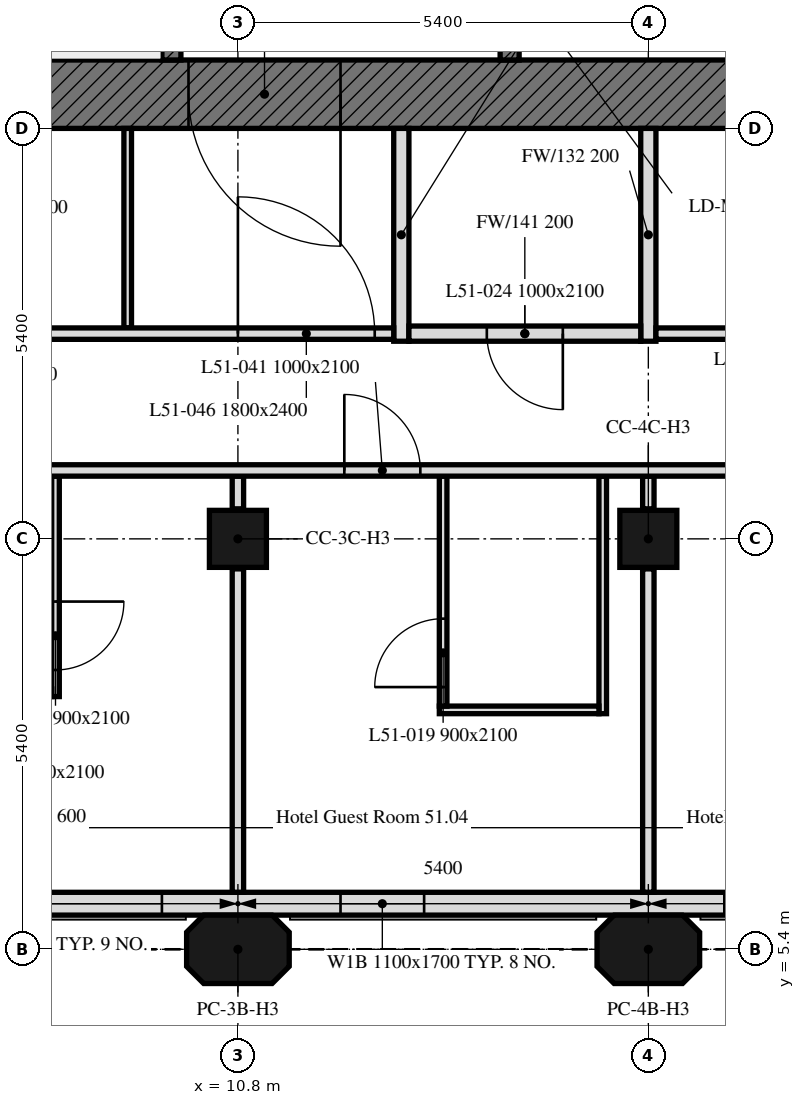
"""IFC4 building model, lengths in metres.
Left out: names, types, materials, properties, quantities, classifications, styles, units other than length and angle.
Written with IfcOpenShell. Run it as: python <this file> out.ifc"""

import sys

from ifc_helpers import new_model, si_unit, direction, frame, frame_2d, origin, origin_2d, place, context, subcontext, project, spatial, polyline, rectangle, outline, extrude, element, fill, save


model = new_model("IFC4")
c1 = context("Model", 3, precision=1e-05, world=origin(), true_north=direction((0.0, 1.0)))
c2 = subcontext(c1, "Body", "Model", "MODEL_VIEW")
j1 = project(units=[si_unit("LENGTHUNIT", "METRE"), si_unit("PLANEANGLEUNIT", "RADIAN")], contexts=[c1])
p1 = place(None, origin())
s1 = spatial("IfcSite", under=j1, at=p1, CompositionType="ELEMENT")
p2 = place(p1, origin())
s2 = spatial("IfcBuilding", under=s1, at=p2, CompositionType="ELEMENT")
p3 = place(p2, frame((0.0, 0.0, 207.1)))
s3 = spatial("IfcBuildingStorey", under=s2, at=p3, CompositionType="ELEMENT", Elevation=207.1)
for number, where, z_axis, x_axis in (
    (1, (10.8, 5.4, 0.0), (0.0, 0.0, 1.0), (1.0, 0.0, 0.0)),
    (2, (16.2, 5.4, 0.0), (0.0, 0.0, 1.0), (1.0, 0.0, 0.0)),
):
    element("IfcColumn", number, at=place(p3, frame(where, z_axis=z_axis, x_axis=x_axis)), inside=s3, PredefinedType="COLUMN", context=c2, shape_type="SweptSolid", body=[
        extrude(outline(polyline([(-0.45, -0.45), (0.45, -0.45), (0.675, -0.225), (0.675, 0.225), (0.45, 0.45), (-0.45, 0.45), (-0.675, 0.225), (-0.675, -0.225), (-0.45, -0.45)])), origin(), (0.0, 0.0, 1.0), 3.0),
    ])
for number, where, z_axis, x_axis in (
    (3, (10.8, 10.8, 0.0), (0.0, 0.0, 1.0), (1.0, 0.0, 0.0)),
    (4, (16.2, 10.8, 0.0), (0.0, 0.0, 1.0), (1.0, 0.0, 0.0)),
):
    element("IfcColumn", number, at=place(p3, frame(where, z_axis=z_axis, x_axis=x_axis)), inside=s3, PredefinedType="COLUMN", context=c2, shape_type="SweptSolid", body=[
        extrude(rectangle(XDim=0.75, YDim=0.75, at=origin_2d()), origin(), (0.0, 0.0, 1.0), 3.0),
    ])
p4 = place(p3, frame((5.586, 6.0, 0.0), z_axis=(0.0, 0.0, 1.0), x_axis=(1.0, 0.0, 0.0)))
e5 = element("IfcWall", 5, at=p4, inside=s3, PredefinedType="SOLIDWALL", context=c2, shape_type="SweptSolid", body=[
    extrude(rectangle(XDim=32.027, YDim=0.3, at=frame_2d((16.014, 0.0))), origin(), (0.0, 0.0, 1.0), 3.0),
])
p5 = place(p4, frame((0.814, 0.0, 0.9)))
e6 = element("IfcOpeningElement", 6, at=p5, cuts=e5, PredefinedType="OPENING", context=c2, shape_type="SweptSolid", body=[
    extrude(rectangle(XDim=3.4, YDim=1.7, at=frame_2d((1.7, 0.85))), frame((0.0, 0.16, 0.0), z_axis=(0.0, -1.0, 0.0), x_axis=(1.0, 0.0, 0.0)), (0.0, 0.0, 1.0), 0.32),
])
p6 = place(p4, frame((6.564, 0.0, 0.9)))
e7 = element("IfcOpeningElement", 7, at=p6, cuts=e5, PredefinedType="OPENING", context=c2, shape_type="SweptSolid", body=[
    extrude(rectangle(XDim=1.1, YDim=1.7, at=frame_2d((0.55, 0.85))), frame((0.0, 0.16, 0.0), z_axis=(0.0, -1.0, 0.0), x_axis=(1.0, 0.0, 0.0)), (0.0, 0.0, 1.0), 0.32),
])
p7 = place(p4, frame((11.614, 0.0, 0.9)))
e8 = element("IfcOpeningElement", 8, at=p7, cuts=e5, PredefinedType="OPENING", context=c2, shape_type="SweptSolid", body=[
    extrude(rectangle(XDim=3.4, YDim=1.7, at=frame_2d((1.7, 0.85))), frame((0.0, 0.16, 0.0), z_axis=(0.0, -1.0, 0.0), x_axis=(1.0, 0.0, 0.0)), (0.0, 0.0, 1.0), 0.32),
])
p8 = place(p4, frame((17.364, 0.0, 0.9)))
e9 = element("IfcOpeningElement", 9, at=p8, cuts=e5, PredefinedType="OPENING", context=c2, shape_type="SweptSolid", body=[
    extrude(rectangle(XDim=1.1, YDim=1.7, at=frame_2d((0.55, 0.85))), frame((0.0, 0.16, 0.0), z_axis=(0.0, -1.0, 0.0), x_axis=(1.0, 0.0, 0.0)), (0.0, 0.0, 1.0), 0.32),
])
p9 = place(p4, frame((22.414, 0.0, 0.9)))
e10 = element("IfcOpeningElement", 10, at=p9, cuts=e5, PredefinedType="OPENING", context=c2, shape_type="SweptSolid", body=[
    extrude(rectangle(XDim=3.4, YDim=1.7, at=frame_2d((1.7, 0.85))), frame((0.0, 0.16, 0.0), z_axis=(0.0, -1.0, 0.0), x_axis=(1.0, 0.0, 0.0)), (0.0, 0.0, 1.0), 0.32),
])
p10 = place(p4, frame((28.164, 0.0, 0.9)))
e11 = element("IfcOpeningElement", 11, at=p10, cuts=e5, PredefinedType="OPENING", context=c2, shape_type="SweptSolid", body=[
    extrude(rectangle(XDim=1.1, YDim=1.7, at=frame_2d((0.55, 0.85))), frame((0.0, 0.16, 0.0), z_axis=(0.0, -1.0, 0.0), x_axis=(1.0, 0.0, 0.0)), (0.0, 0.0, 1.0), 0.32),
])
p11 = place(p3, frame((17.7, 16.65, 0.0), z_axis=(0.0, 0.0, 1.0), x_axis=(-1.0, 0.0, 0.0)))
e12 = element("IfcWall", 12, at=p11, inside=s3, PredefinedType="SOLIDWALL", context=c2, shape_type="SweptSolid", body=[
    extrude(rectangle(XDim=11.1, YDim=0.9, at=frame_2d((5.55, 0.0))), origin(), (0.0, 0.0, 1.0), 3.0),
])
p12 = place(p11, frame((5.55, 0.0, 0.0)))
e13 = element("IfcOpeningElement", 13, at=p12, cuts=e12, PredefinedType="OPENING", context=c2, shape_type="SweptSolid", body=[
    extrude(rectangle(XDim=2.0, YDim=2.4, at=frame_2d((1.0, 1.2))), frame((0.0, 0.45, 0.0), z_axis=(0.0, -1.0, 0.0), x_axis=(1.0, 0.0, 0.0)), (0.0, 0.0, 1.0), 0.9),
])
p13 = place(p3, frame((9.925, 17.1, 0.0), z_axis=(0.0, 0.0, 1.0), x_axis=(0.0, 1.0, 0.0)))
e14 = element("IfcWall", 14, at=p13, inside=s3, PredefinedType="SOLIDWALL", context=c2, shape_type="SweptSolid", body=[
    extrude(rectangle(XDim=14.4, YDim=0.25, at=frame_2d((7.2, 0.0))), origin(), (0.0, 0.0, 1.0), 3.0),
])
p14 = place(p13, frame((4.6, 0.0, 0.0)))
e15 = element("IfcOpeningElement", 15, at=p14, cuts=e14, PredefinedType="OPENING", context=c2, shape_type="SweptSolid", body=[
    extrude(rectangle(XDim=1.0, YDim=2.1, at=frame_2d((0.5, 1.05))), frame((0.0, 0.125, 0.0), z_axis=(0.0, -1.0, 0.0), x_axis=(1.0, 0.0, 0.0)), (0.0, 0.0, 1.0), 0.25),
])
p15 = place(p13, frame((7.062, 0.0, 0.0)))
e16 = element("IfcOpeningElement", 16, at=p15, cuts=e14, PredefinedType="OPENING", context=c2, shape_type="SweptSolid", body=[
    extrude(rectangle(XDim=1.2, YDim=2.1, at=frame_2d((0.6, 1.05))), frame((0.0, 0.125, 0.0), z_axis=(0.0, -1.0, 0.0), x_axis=(1.0, 0.0, 0.0)), (0.0, 0.0, 1.0), 0.25),
])
p16 = place(p13, frame((9.979, 0.0, 0.0)))
e17 = element("IfcOpeningElement", 17, at=p16, cuts=e14, PredefinedType="OPENING", context=c2, shape_type="SweptSolid", body=[
    extrude(rectangle(XDim=0.9, YDim=2.1, at=frame_2d((0.45, 1.05))), frame((0.0, 0.125, 0.0), z_axis=(0.0, -1.0, 0.0), x_axis=(1.0, 0.0, 0.0)), (0.0, 0.0, 1.0), 0.25),
])
p17 = place(p13, frame((11.92, 0.0, 0.0)))
e18 = element("IfcOpeningElement", 18, at=p17, cuts=e14, PredefinedType="OPENING", context=c2, shape_type="SweptSolid", body=[
    extrude(rectangle(XDim=0.9, YDim=2.1, at=frame_2d((0.45, 1.05))), frame((0.0, 0.125, 0.0), z_axis=(0.0, -1.0, 0.0), x_axis=(1.0, 0.0, 0.0)), (0.0, 0.0, 1.0), 0.25),
])
p18 = place(p13, frame((13.354, 0.0, 0.0)))
e19 = element("IfcOpeningElement", 19, at=p18, cuts=e14, PredefinedType="OPENING", context=c2, shape_type="SweptSolid", body=[
    extrude(rectangle(XDim=0.9, YDim=2.1, at=frame_2d((0.45, 1.05))), frame((0.0, 0.125, 0.0), z_axis=(0.0, -1.0, 0.0), x_axis=(1.0, 0.0, 0.0)), (0.0, 0.0, 1.0), 0.25),
])
p19 = place(p3, frame((14.375, 17.1, 0.0), z_axis=(0.0, 0.0, 1.0), x_axis=(0.0, 1.0, 0.0)))
e20 = element("IfcWall", 20, at=p19, inside=s3, PredefinedType="SOLIDWALL", context=c2, shape_type="SweptSolid", body=[
    extrude(rectangle(XDim=14.4, YDim=0.25, at=frame_2d((7.2, 0.0))), origin(), (0.0, 0.0, 1.0), 3.0),
])
p20 = place(p19, frame((13.15, 0.0, 0.0)))
e21 = element("IfcOpeningElement", 21, at=p20, cuts=e20, PredefinedType="OPENING", context=c2, shape_type="SweptSolid", body=[
    extrude(rectangle(XDim=1.0, YDim=2.1, at=frame_2d((0.5, 1.05))), frame((0.0, 0.125, 0.0), z_axis=(0.0, -1.0, 0.0), x_axis=(1.0, 0.0, 0.0)), (0.0, 0.0, 1.0), 0.25),
])
p21 = place(p19, frame((0.6, 0.0, 0.0)))
e22 = element("IfcOpeningElement", 22, at=p21, cuts=e20, PredefinedType="OPENING", context=c2, shape_type="SweptSolid", body=[
    extrude(rectangle(XDim=1.1, YDim=2.1, at=frame_2d((0.55, 1.05))), frame((0.0, 0.125, 0.0), z_axis=(0.0, -1.0, 0.0), x_axis=(1.0, 0.0, 0.0)), (0.0, 0.0, 1.0), 0.25),
])
p22 = place(p19, frame((3.25, 0.0, 0.0)))
e23 = element("IfcOpeningElement", 23, at=p22, cuts=e20, PredefinedType="OPENING", context=c2, shape_type="SweptSolid", body=[
    extrude(rectangle(XDim=0.9, YDim=2.1, at=frame_2d((0.45, 1.05))), frame((0.0, 0.125, 0.0), z_axis=(0.0, -1.0, 0.0), x_axis=(1.0, 0.0, 0.0)), (0.0, 0.0, 1.0), 0.25),
])
p23 = place(p3, frame((16.2, 11.625, 0.0), z_axis=(0.0, 0.0, 1.0), x_axis=(0.0, -1.0, 0.0)))
e24 = element("IfcWall", 24, at=p23, inside=s3, PredefinedType="PARTITIONING", context=c2, shape_type="SweptSolid", body=[
    extrude(rectangle(XDim=0.43, YDim=0.15, at=frame_2d((0.215, 0.0))), origin(), (0.0, 0.0, 1.0), 3.0),
])
p24 = place(p3, frame((16.2, 10.405, 0.0), z_axis=(0.0, 0.0, 1.0), x_axis=(0.0, -1.0, 0.0)))
e25 = element("IfcWall", 25, at=p24, inside=s3, PredefinedType="PARTITIONING", context=c2, shape_type="SweptSolid", body=[
    extrude(rectangle(XDim=4.254, YDim=0.15, at=frame_2d((2.127, 0.0))), origin(), (0.0, 0.0, 1.0), 3.0),
])
p25 = place(p3, frame((15.6, 11.625, 0.0), z_axis=(0.0, 0.0, 1.0), x_axis=(0.0, -1.0, 0.0)))
e26 = element("IfcWall", 26, at=p25, inside=s3, PredefinedType="PARTITIONING", context=c2, shape_type="SweptSolid", body=[
    extrude(rectangle(XDim=3.125, YDim=0.1, at=frame_2d((1.562, 0.0))), origin(), (0.0, 0.0, 1.0), 3.0),
])
p26 = place(p3, frame((15.55, 8.55, 0.0), z_axis=(0.0, 0.0, 1.0), x_axis=(-1.0, 0.0, 0.0)))
e27 = element("IfcWall", 27, at=p26, inside=s3, PredefinedType="PARTITIONING", context=c2, shape_type="SweptSolid", body=[
    extrude(rectangle(XDim=2.1, YDim=0.1, at=frame_2d((1.05, 0.0))), origin(), (0.0, 0.0, 1.0), 3.0),
])
p27 = place(p3, frame((13.5, 8.6, 0.0), z_axis=(0.0, 0.0, 1.0), x_axis=(0.0, 1.0, 0.0)))
e28 = element("IfcWall", 28, at=p27, inside=s3, PredefinedType="PARTITIONING", context=c2, shape_type="SweptSolid", body=[
    extrude(rectangle(XDim=3.025, YDim=0.1, at=frame_2d((1.512, 0.0))), origin(), (0.0, 0.0, 1.0), 3.0),
])
p28 = place(p27, frame((0.25, 0.0, 0.0)))
e29 = element("IfcOpeningElement", 29, at=p28, cuts=e28, PredefinedType="OPENING", context=c2, shape_type="SweptSolid", body=[
    extrude(rectangle(XDim=0.9, YDim=2.1, at=frame_2d((0.45, 1.05))), frame((0.0, 0.05, 0.0), z_axis=(0.0, -1.0, 0.0), x_axis=(1.0, 0.0, 0.0)), (0.0, 0.0, 1.0), 0.1),
])
p29 = place(p3, frame((10.8, 11.625, 0.0), z_axis=(0.0, 0.0, 1.0), x_axis=(0.0, -1.0, 0.0)))
e30 = element("IfcWall", 30, at=p29, inside=s3, PredefinedType="PARTITIONING", context=c2, shape_type="SweptSolid", body=[
    extrude(rectangle(XDim=0.43, YDim=0.15, at=frame_2d((0.215, 0.0))), origin(), (0.0, 0.0, 1.0), 3.0),
])
p30 = place(p3, frame((10.8, 10.405, 0.0), z_axis=(0.0, 0.0, 1.0), x_axis=(0.0, -1.0, 0.0)))
e31 = element("IfcWall", 31, at=p30, inside=s3, PredefinedType="PARTITIONING", context=c2, shape_type="SweptSolid", body=[
    extrude(rectangle(XDim=4.254, YDim=0.15, at=frame_2d((2.127, 0.0))), origin(), (0.0, 0.0, 1.0), 3.0),
])
p31 = place(p3, frame((8.4, 11.625, 0.0), z_axis=(0.0, 0.0, 1.0), x_axis=(0.0, -1.0, 0.0)))
e32 = element("IfcWall", 32, at=p31, inside=s3, PredefinedType="PARTITIONING", context=c2, shape_type="SweptSolid", body=[
    extrude(rectangle(XDim=2.9, YDim=0.1, at=frame_2d((1.45, 0.0))), origin(), (0.0, 0.0, 1.0), 3.0),
])
p32 = place(p31, frame((1.65, 0.0, 0.0)))
e33 = element("IfcOpeningElement", 33, at=p32, cuts=e32, PredefinedType="OPENING", context=c2, shape_type="SweptSolid", body=[
    extrude(rectangle(XDim=0.9, YDim=2.1, at=frame_2d((0.45, 1.05))), frame((0.0, 0.05, 0.0), z_axis=(0.0, -1.0, 0.0), x_axis=(1.0, 0.0, 0.0)), (0.0, 0.0, 1.0), 0.1),
])
p33 = place(p3, frame((0.751, 11.7, 0.0), z_axis=(0.0, 0.0, 1.0), x_axis=(1.0, 0.0, 0.0)))
e34 = element("IfcWall", 34, at=p33, inside=s3, PredefinedType="PARTITIONING", context=c2, shape_type="SweptSolid", body=[
    extrude(rectangle(XDim=41.698, YDim=0.15, at=frame_2d((20.849, 0.0))), origin(), (0.0, 0.0, 1.0), 3.0),
])
p34 = place(p33, frame((27.649, 0.0, 0.0)))
e35 = element("IfcOpeningElement", 35, at=p34, cuts=e34, PredefinedType="OPENING", context=c2, shape_type="SweptSolid", body=[
    extrude(rectangle(XDim=1.0, YDim=2.1, at=frame_2d((0.5, 1.05))), frame((0.0, 0.075, 0.0), z_axis=(0.0, -1.0, 0.0), x_axis=(1.0, 0.0, 0.0)), (0.0, 0.0, 1.0), 0.15),
])
p35 = place(p33, frame((22.249, 0.0, 0.0)))
e36 = element("IfcOpeningElement", 36, at=p35, cuts=e34, PredefinedType="OPENING", context=c2, shape_type="SweptSolid", body=[
    extrude(rectangle(XDim=1.0, YDim=2.1, at=frame_2d((0.5, 1.05))), frame((0.0, 0.075, 0.0), z_axis=(0.0, -1.0, 0.0), x_axis=(1.0, 0.0, 0.0)), (0.0, 0.0, 1.0), 0.15),
])
p36 = place(p33, frame((16.849, 0.0, 0.0)))
e37 = element("IfcOpeningElement", 37, at=p36, cuts=e34, PredefinedType="OPENING", context=c2, shape_type="SweptSolid", body=[
    extrude(rectangle(XDim=1.0, YDim=2.1, at=frame_2d((0.5, 1.05))), frame((0.0, 0.075, 0.0), z_axis=(0.0, -1.0, 0.0), x_axis=(1.0, 0.0, 0.0)), (0.0, 0.0, 1.0), 0.15),
])
p37 = place(p33, frame((11.449, 0.0, 0.0)))
e38 = element("IfcOpeningElement", 38, at=p37, cuts=e34, PredefinedType="OPENING", context=c2, shape_type="SweptSolid", body=[
    extrude(rectangle(XDim=1.0, YDim=2.1, at=frame_2d((0.5, 1.05))), frame((0.0, 0.075, 0.0), z_axis=(0.0, -1.0, 0.0), x_axis=(1.0, 0.0, 0.0)), (0.0, 0.0, 1.0), 0.15),
])
p38 = place(p33, frame((2.744, 0.0, 0.0)))
e39 = element("IfcOpeningElement", 39, at=p38, cuts=e34, PredefinedType="OPENING", context=c2, shape_type="SweptSolid", body=[
    extrude(rectangle(XDim=1.0, YDim=2.1, at=frame_2d((0.5, 1.05))), frame((0.0, 0.075, 0.0), z_axis=(0.0, -1.0, 0.0), x_axis=(1.0, 0.0, 0.0)), (0.0, 0.0, 1.0), 0.15),
])
p39 = place(p33, frame((39.249, 0.0, 0.0)))
e40 = element("IfcOpeningElement", 40, at=p39, cuts=e34, PredefinedType="OPENING", context=c2, shape_type="SweptSolid", body=[
    extrude(rectangle(XDim=1.0, YDim=2.1, at=frame_2d((0.5, 1.05))), frame((0.0, 0.075, 0.0), z_axis=(0.0, -1.0, 0.0), x_axis=(1.0, 0.0, 0.0)), (0.0, 0.0, 1.0), 0.15),
])
p40 = place(p3, frame((16.2, 16.2, 0.0), z_axis=(0.0, 0.0, 1.0), x_axis=(0.0, -1.0, 0.0)))
e41 = element("IfcWall", 41, at=p40, inside=s3, PredefinedType="PARTITIONING", context=c2, shape_type="SweptSolid", body=[
    extrude(rectangle(XDim=2.8, YDim=0.2, at=frame_2d((1.4, 0.0))), origin(), (0.0, 0.0, 1.0), 3.0),
])
p41 = place(p3, frame((9.35, 16.2, 0.0), z_axis=(0.0, 0.0, 1.0), x_axis=(0.0, -1.0, 0.0)))
e42 = element("IfcWall", 42, at=p41, inside=s3, PredefinedType="PARTITIONING", context=c2, shape_type="SweptSolid", body=[
    extrude(rectangle(XDim=2.625, YDim=0.1, at=frame_2d((1.312, 0.0))), origin(), (0.0, 0.0, 1.0), 3.0),
])
p42 = place(p3, frame((12.95, 13.4, 0.0), z_axis=(0.0, 0.0, 1.0), x_axis=(0.0, 1.0, 0.0)))
e43 = element("IfcWall", 43, at=p42, inside=s3, PredefinedType="PARTITIONING", context=c2, shape_type="SweptSolid", body=[
    extrude(rectangle(XDim=2.8, YDim=0.2, at=frame_2d((1.4, 0.0))), origin(), (0.0, 0.0, 1.0), 3.0),
])
p43 = place(p3, frame((16.3, 13.5, 0.0), z_axis=(0.0, 0.0, 1.0), x_axis=(1.0, 0.0, 0.0)))
e44 = element("IfcWall", 44, at=p43, inside=s3, PredefinedType="PARTITIONING", context=c2, shape_type="SweptSolid", body=[
    extrude(rectangle(XDim=26.149, YDim=0.15, at=frame_2d((13.074, 0.0))), origin(), (0.0, 0.0, 1.0), 3.0),
])
p44 = place(p43, frame((7.5, 0.0, 0.0)))
e45 = element("IfcOpeningElement", 45, at=p44, cuts=e44, PredefinedType="OPENING", context=c2, shape_type="SweptSolid", body=[
    extrude(rectangle(XDim=1.0, YDim=2.1, at=frame_2d((0.5, 1.05))), frame((0.0, 0.075, 0.0), z_axis=(0.0, -1.0, 0.0), x_axis=(1.0, 0.0, 0.0)), (0.0, 0.0, 1.0), 0.15),
])
p45 = place(p43, frame((23.12, 0.0, 0.0)))
e46 = element("IfcOpeningElement", 46, at=p45, cuts=e44, PredefinedType="OPENING", context=c2, shape_type="SweptSolid", body=[
    extrude(rectangle(XDim=1.0, YDim=2.1, at=frame_2d((0.5, 1.05))), frame((0.0, 0.075, 0.0), z_axis=(0.0, -1.0, 0.0), x_axis=(1.0, 0.0, 0.0)), (0.0, 0.0, 1.0), 0.15),
])
p46 = place(p43, frame((17.225, 0.0, 0.0)))
e47 = element("IfcOpeningElement", 47, at=p46, cuts=e44, PredefinedType="OPENING", context=c2, shape_type="SweptSolid", body=[
    extrude(rectangle(XDim=1.0, YDim=2.1, at=frame_2d((0.5, 1.05))), frame((0.0, 0.075, 0.0), z_axis=(0.0, -1.0, 0.0), x_axis=(1.0, 0.0, 0.0)), (0.0, 0.0, 1.0), 0.15),
])
p47 = place(p43, frame((19.65, 0.0, 0.0)))
e48 = element("IfcOpeningElement", 48, at=p47, cuts=e44, PredefinedType="OPENING", context=c2, shape_type="SweptSolid", body=[
    extrude(rectangle(XDim=1.8, YDim=2.4, at=frame_2d((0.9, 1.2))), frame((0.0, 0.075, 0.0), z_axis=(0.0, -1.0, 0.0), x_axis=(1.0, 0.0, 0.0)), (0.0, 0.0, 1.0), 0.15),
])
p48 = place(p3, frame((16.1, 13.5, 0.0), z_axis=(0.0, 0.0, 1.0), x_axis=(-1.0, 0.0, 0.0)))
e49 = element("IfcWall", 49, at=p48, inside=s3, PredefinedType="PARTITIONING", context=c2, shape_type="SweptSolid", body=[
    extrude(rectangle(XDim=3.05, YDim=0.2, at=frame_2d((1.525, 0.0))), origin(), (0.0, 0.0, 1.0), 3.0),
])
p49 = place(p48, frame((1.025, 0.0, 0.0)))
e50 = element("IfcOpeningElement", 50, at=p49, cuts=e49, PredefinedType="OPENING", context=c2, shape_type="SweptSolid", body=[
    extrude(rectangle(XDim=1.0, YDim=2.1, at=frame_2d((0.5, 1.05))), frame((0.0, 0.1, 0.0), z_axis=(0.0, -1.0, 0.0), x_axis=(1.0, 0.0, 0.0)), (0.0, 0.0, 1.0), 0.2),
])
p50 = place(p3, frame((5.325, 13.5, 0.0), z_axis=(0.0, 0.0, 1.0), x_axis=(1.0, 0.0, 0.0)))
e51 = element("IfcWall", 51, at=p50, inside=s3, PredefinedType="PARTITIONING", context=c2, shape_type="SweptSolid", body=[
    extrude(rectangle(XDim=7.525, YDim=0.15, at=frame_2d((3.763, 0.0))), origin(), (0.0, 0.0, 1.0), 3.0),
])
p51 = place(p50, frame((1.55, 0.0, 0.0)))
e52 = element("IfcOpeningElement", 52, at=p51, cuts=e51, PredefinedType="OPENING", context=c2, shape_type="SweptSolid", body=[
    extrude(rectangle(XDim=1.0, YDim=2.1, at=frame_2d((0.5, 1.05))), frame((0.0, 0.075, 0.0), z_axis=(0.0, -1.0, 0.0), x_axis=(1.0, 0.0, 0.0)), (0.0, 0.0, 1.0), 0.15),
])
p52 = place(p50, frame((5.475, 0.0, 0.0)))
e53 = element("IfcOpeningElement", 53, at=p52, cuts=e51, PredefinedType="OPENING", context=c2, shape_type="SweptSolid", body=[
    extrude(rectangle(XDim=1.8, YDim=2.4, at=frame_2d((0.9, 1.2))), frame((0.0, 0.075, 0.0), z_axis=(0.0, -1.0, 0.0), x_axis=(1.0, 0.0, 0.0)), (0.0, 0.0, 1.0), 0.15),
])
p53 = place(p5, origin())
e54 = element("IfcWindow", 54, at=p53, inside=s3, PartitioningType="SINGLE_PANEL", PredefinedType="WINDOW", context=c2, shape_type="SweptSolid", body=[
    extrude(rectangle(XDim=3.4, YDim=1.7, at=frame_2d((1.7, 0.85))), frame((0.0, 0.03, 0.0), z_axis=(0.0, -1.0, 0.0), x_axis=(1.0, 0.0, 0.0)), (0.0, 0.0, 1.0), 0.06),
])
fill(e6, e54)
p54 = place(p6, origin())
e55 = element("IfcWindow", 55, at=p54, inside=s3, PartitioningType="SINGLE_PANEL", PredefinedType="WINDOW", context=c2, shape_type="SweptSolid", body=[
    extrude(rectangle(XDim=1.1, YDim=1.7, at=frame_2d((0.55, 0.85))), frame((0.0, 0.03, 0.0), z_axis=(0.0, -1.0, 0.0), x_axis=(1.0, 0.0, 0.0)), (0.0, 0.0, 1.0), 0.06),
])
fill(e7, e55)
p55 = place(p12, origin())
e56 = element("IfcDoor", 56, at=p55, inside=s3, OperationType="DOUBLE_DOOR_SINGLE_SWING", PredefinedType="DOOR", context=c2, shape_type="SweptSolid", body=[
    extrude(rectangle(XDim=2.0, YDim=2.4, at=frame_2d((1.0, 1.2))), frame((0.0, 0.025, 0.0), z_axis=(0.0, -1.0, 0.0), x_axis=(1.0, 0.0, 0.0)), (0.0, 0.0, 1.0), 0.05),
])
fill(e13, e56)
p56 = place(p28, origin())
e57 = element("IfcDoor", 57, at=p56, inside=s3, OperationType="SINGLE_SWING_RIGHT", PredefinedType="DOOR", context=c2, shape_type="SweptSolid", body=[
    extrude(rectangle(XDim=0.9, YDim=2.1, at=frame_2d((0.45, 1.05))), frame((0.0, 0.025, 0.0), z_axis=(0.0, -1.0, 0.0), x_axis=(1.0, 0.0, 0.0)), (0.0, 0.0, 1.0), 0.05),
])
fill(e29, e57)
p57 = place(p32, origin())
e58 = element("IfcDoor", 58, at=p57, inside=s3, OperationType="SINGLE_SWING_RIGHT", PredefinedType="DOOR", context=c2, shape_type="SweptSolid", body=[
    extrude(rectangle(XDim=0.9, YDim=2.1, at=frame_2d((0.45, 1.05))), frame((0.0, 0.025, 0.0), z_axis=(0.0, -1.0, 0.0), x_axis=(1.0, 0.0, 0.0)), (0.0, 0.0, 1.0), 0.05),
])
fill(e33, e58)
p58 = place(p49, origin())
e59 = element("IfcDoor", 59, at=p58, inside=s3, OperationType="SINGLE_SWING_RIGHT", PredefinedType="DOOR", context=c2, shape_type="SweptSolid", body=[
    extrude(rectangle(XDim=1.0, YDim=2.1, at=frame_2d((0.5, 1.05))), frame((0.0, 0.025, 0.0), z_axis=(0.0, -1.0, 0.0), x_axis=(1.0, 0.0, 0.0)), (0.0, 0.0, 1.0), 0.05),
])
fill(e50, e59)
p59 = place(p37, origin())
e60 = element("IfcDoor", 60, at=p59, inside=s3, OperationType="SINGLE_SWING_RIGHT", PredefinedType="DOOR", context=c2, shape_type="SweptSolid", body=[
    extrude(rectangle(XDim=1.0, YDim=2.1, at=frame_2d((0.5, 1.05))), frame((0.0, 0.025, 0.0), z_axis=(0.0, -1.0, 0.0), x_axis=(1.0, 0.0, 0.0)), (0.0, 0.0, 1.0), 0.05),
])
fill(e38, e60)
p60 = place(p52, origin())
e61 = element("IfcDoor", 61, at=p60, inside=s3, OperationType="DOUBLE_DOOR_SINGLE_SWING", PredefinedType="DOOR", context=c2, shape_type="SweptSolid", body=[
    extrude(rectangle(XDim=1.8, YDim=2.4, at=frame_2d((0.9, 1.2))), frame((0.0, 0.025, 0.0), z_axis=(0.0, -1.0, 0.0), x_axis=(1.0, 0.0, 0.0)), (0.0, 0.0, 1.0), 0.05),
])
fill(e53, e61)
save(model, sys.argv[1])
